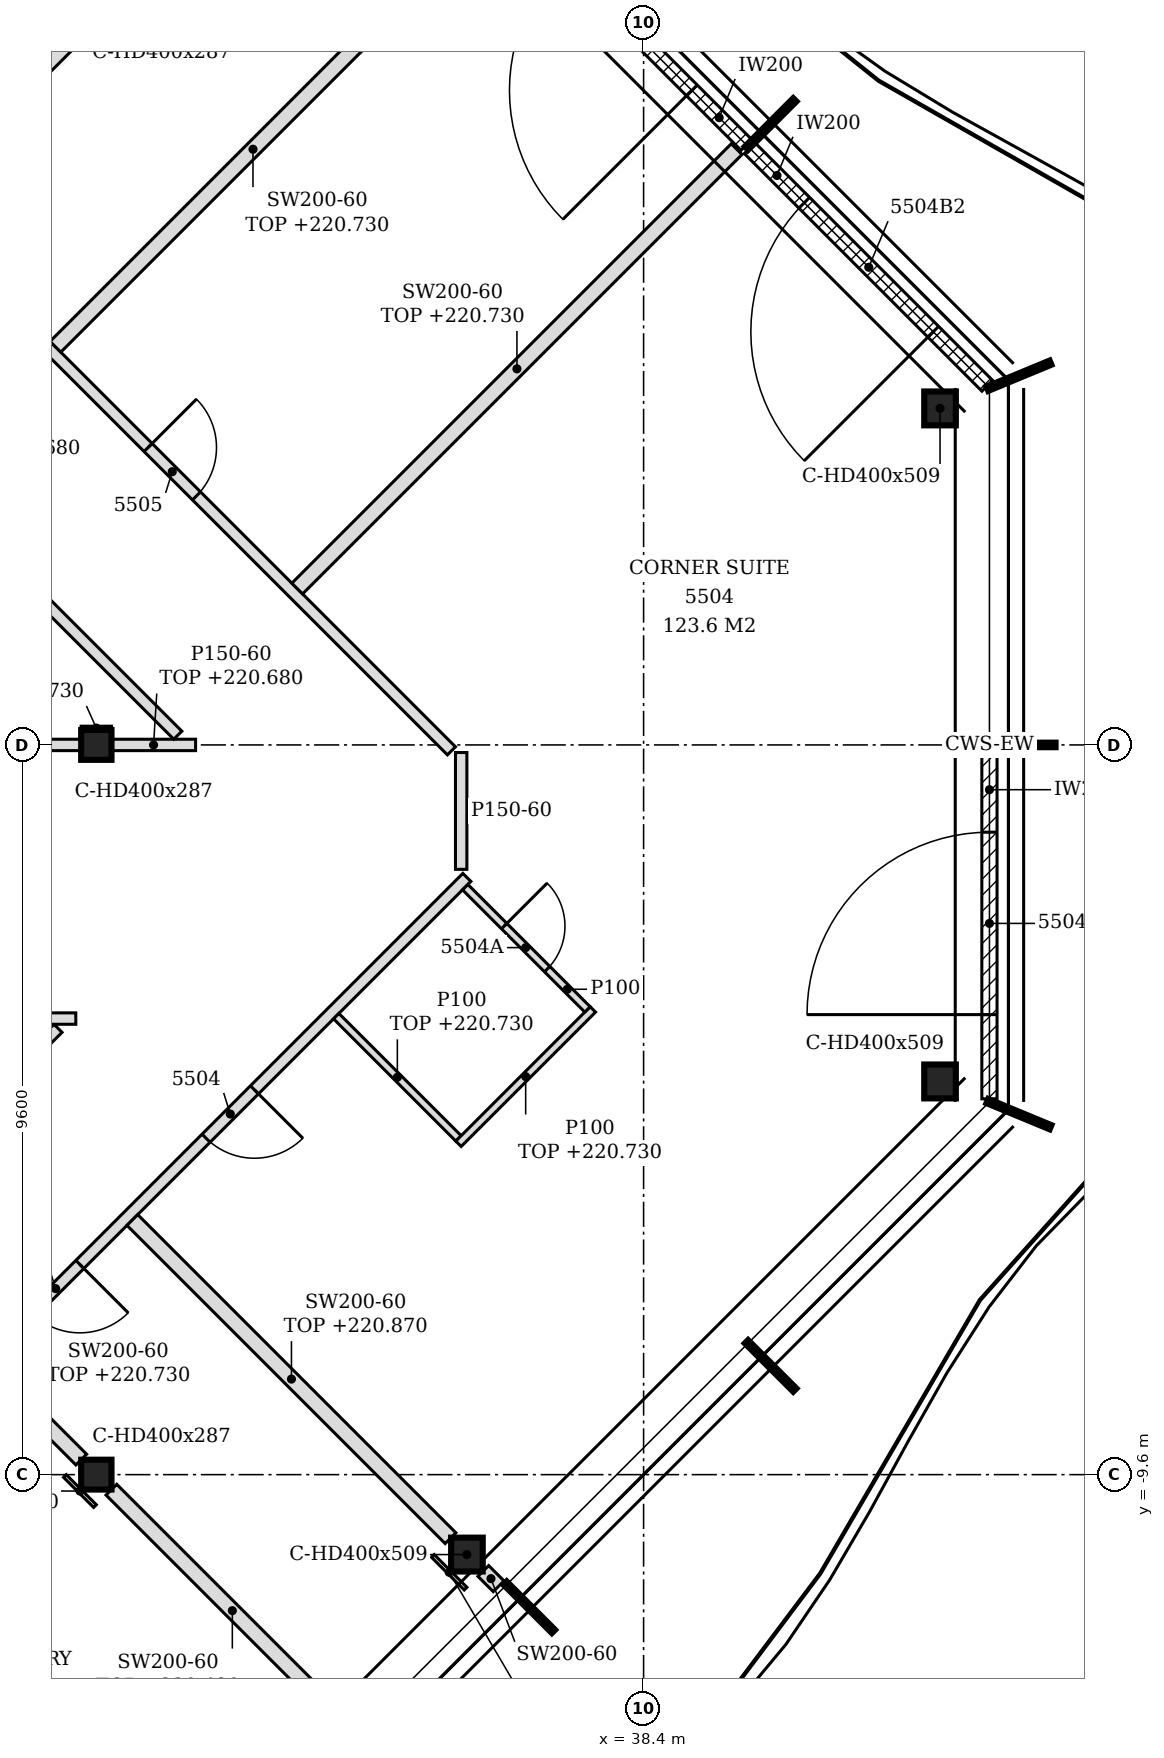
"""IFC4 building model, lengths in metres.
Left out: names, types, materials, properties, quantities, classifications, styles, units other than length and angle.
Written with IfcOpenShell. Run it as: python <this file> out.ifc"""

import sys

from ifc_helpers import new_model, si_unit, direction, frame, frame_2d, origin, origin_2d, place, context, subcontext, project, spatial, polyline, rectangle, i_section, outline, extrude, element, fill, save


model = new_model("IFC4")
c1 = context("Model", 3, precision=1e-05, world=origin(), true_north=direction((0.0, 1.0)))
c2 = subcontext(c1, "Body", "Model", "MODEL_VIEW")
j1 = project(units=[si_unit("LENGTHUNIT", "METRE"), si_unit("PLANEANGLEUNIT", "RADIAN")], contexts=[c1])
p1 = place(None, origin())
s1 = spatial("IfcSite", under=j1, at=p1, CompositionType="ELEMENT")
p2 = place(p1, origin())
s2 = spatial("IfcBuilding", under=s1, at=p2, CompositionType="ELEMENT")
p3 = place(p2, frame((0.0, 0.0, 217.8)))
s3 = spatial("IfcBuildingStorey", under=s2, at=p3, CompositionType="ELEMENT", Elevation=217.8)
for number, where, z_axis, x_axis in (
    (1, (36.076, -10.652, -0.15), (0.0, 0.0, 1.0), (1.0, 0.0, 0.0)),
    (2, (42.3, -4.427, -0.15), (0.0, 0.0, 1.0), (1.0, 0.0, 0.0)),
    (3, (42.3, 4.427, -0.15), (0.0, 0.0, 1.0), (1.0, 0.0, 0.0)),
):
    element("IfcColumn", number, at=place(p3, frame(where, z_axis=z_axis, x_axis=x_axis)), inside=s3, PredefinedType="COLUMN", context=c2, shape_type="SweptSolid", body=[
        extrude(i_section(OverallWidth=0.416, OverallDepth=0.446, WebThickness=0.039, FlangeThickness=0.063, FilletRadius=0.015, at=origin_2d()), origin(), (0.0, 0.0, 1.0), 3.6),
    ])
for number, where, z_axis, x_axis in (
    (4, (31.2, -9.6, -0.15), (0.0, 0.0, 1.0), (1.0, 0.0, 0.0)),
    (5, (31.2, 0.0, -0.15), (0.0, 0.0, 1.0), (1.0, 0.0, 0.0)),
):
    element("IfcColumn", number, at=place(p3, frame(where, z_axis=z_axis, x_axis=x_axis)), inside=s3, PredefinedType="COLUMN", context=c2, shape_type="SweptSolid", body=[
        extrude(i_section(OverallWidth=0.399, OverallDepth=0.393, WebThickness=0.023, FlangeThickness=0.037, FilletRadius=0.015, at=origin_2d()), origin(), (0.0, 0.0, 1.0), 3.6),
    ])
p4 = place(p3, frame((42.95, -4.656, 0.0), z_axis=(0.0, 0.0, 1.0), x_axis=(0.0, 1.0, 0.0)))
e6 = element("IfcWall", 6, at=p4, inside=s3, PredefinedType="NOTDEFINED", context=c2, shape_type="SweptSolid", body=[
    extrude(rectangle(XDim=4.626, YDim=0.2, at=frame_2d((2.313, 0.0))), origin(), (0.0, 0.0, 1.0), 3.45),
])
p5 = place(p4, frame((1.108, 0.0, 0.0)))
e7 = element("IfcOpeningElement", 7, at=p5, cuts=e6, PredefinedType="OPENING", context=c2, shape_type="SweptSolid", body=[
    extrude(rectangle(XDim=2.4, YDim=2.4, at=frame_2d((1.2, 1.2))), frame((0.0, 0.11, 0.0), z_axis=(0.0, -1.0, 0.0), x_axis=(1.0, 0.0, 0.0)), (0.0, 0.0, 1.0), 0.22),
])
p6 = place(p3, frame((42.922, 4.725, 0.0), z_axis=(0.0, 0.0, 1.0), x_axis=(-0.707079168996, 0.707134392299, 0.0)))
e8 = element("IfcWall", 8, at=p6, inside=s3, PredefinedType="NOTDEFINED", context=c2, shape_type="SweptSolid", body=[
    extrude(rectangle(XDim=4.421, YDim=0.2, at=frame_2d((2.21, 0.0))), origin(), (0.0, 0.0, 1.0), 3.45),
])
p7 = place(p6, frame((1.005, 0.0, 0.0)))
e9 = element("IfcOpeningElement", 9, at=p7, cuts=e8, PredefinedType="OPENING", context=c2, shape_type="SweptSolid", body=[
    extrude(rectangle(XDim=2.4, YDim=2.4, at=frame_2d((1.2, 1.2))), frame((0.0, 0.11, 0.0), z_axis=(0.0, -1.0, 0.0), x_axis=(1.0, 0.0, 0.0)), (0.0, 0.0, 1.0), 0.22),
])
p8 = place(p3, frame((39.753, 7.893, 0.0), z_axis=(0.0, 0.0, 1.0), x_axis=(-0.707106781187, 0.707106781187, 0.0)))
e10 = element("IfcWall", 10, at=p8, inside=s3, PredefinedType="NOTDEFINED", context=c2, shape_type="SweptSolid", body=[
    extrude(rectangle(XDim=4.431, YDim=0.2, at=frame_2d((2.215, 0.0))), origin(), (0.0, 0.0, 1.0), 3.45),
])
p9 = place(p8, frame((1.016, 0.0, 0.0)))
e11 = element("IfcOpeningElement", 11, at=p9, cuts=e10, PredefinedType="OPENING", context=c2, shape_type="SweptSolid", body=[
    extrude(rectangle(XDim=2.4, YDim=2.4, at=frame_2d((1.2, 1.2))), frame((0.0, 0.11, 0.0), z_axis=(0.0, -1.0, 0.0), x_axis=(1.0, 0.0, 0.0)), (0.0, 0.0, 1.0), 0.22),
])
p10 = place(p3, frame((21.146, -16.672, 0.0), z_axis=(0.0, 0.0, 1.0), x_axis=(0.707100999376, 0.70711256295, 0.0)))
e12 = element("IfcWall", 12, at=p10, inside=s3, PredefinedType="PARTITIONING", context=c2, shape_type="SweptSolid", body=[
    extrude(rectangle(XDim=21.113, YDim=0.15, at=frame_2d((10.556, 0.0))), origin(), (0.0, 0.0, 1.0), 2.88),
])
p11 = place(p10, frame((2.466, 0.0, 0.0)))
e13 = element("IfcOpeningElement", 13, at=p11, cuts=e12, PredefinedType="OPENING", context=c2, shape_type="SweptSolid", body=[
    extrude(rectangle(XDim=0.9, YDim=2.1, at=frame_2d((0.45, 1.05))), frame((0.0, 0.085, 0.0), z_axis=(0.0, -1.0, 0.0), x_axis=(1.0, 0.0, 0.0)), (0.0, 0.0, 1.0), 0.17),
])
p12 = place(p10, frame((8.611, 0.0, 0.0)))
e14 = element("IfcOpeningElement", 14, at=p12, cuts=e12, PredefinedType="OPENING", context=c2, shape_type="SweptSolid", body=[
    extrude(rectangle(XDim=0.9, YDim=2.1, at=frame_2d((0.45, 1.05))), frame((0.0, 0.085, 0.0), z_axis=(0.0, -1.0, 0.0), x_axis=(1.0, 0.0, 0.0)), (0.0, 0.0, 1.0), 0.17),
])
p13 = place(p10, frame((13.012, 0.0, 0.0)))
e15 = element("IfcOpeningElement", 15, at=p13, cuts=e12, PredefinedType="OPENING", context=c2, shape_type="SweptSolid", body=[
    extrude(rectangle(XDim=0.9, YDim=2.1, at=frame_2d((0.45, 1.05))), frame((0.0, 0.085, 0.0), z_axis=(0.0, -1.0, 0.0), x_axis=(1.0, 0.0, 0.0)), (0.0, 0.0, 1.0), 0.17),
])
p14 = place(p10, frame((16.261, 0.0, 0.0)))
e16 = element("IfcOpeningElement", 16, at=p14, cuts=e12, PredefinedType="OPENING", context=c2, shape_type="SweptSolid", body=[
    extrude(rectangle(XDim=0.9, YDim=2.1, at=frame_2d((0.45, 1.05))), frame((0.0, 0.085, 0.0), z_axis=(0.0, -1.0, 0.0), x_axis=(1.0, 0.0, 0.0)), (0.0, 0.0, 1.0), 0.17),
])
p15 = place(p3, frame((34.581, -12.981, 0.0), z_axis=(0.0, 0.0, 1.0), x_axis=(-0.707133900936, 0.707079660397, 0.0)))
e17 = element("IfcWall", 17, at=p15, inside=s3, PredefinedType="PARTITIONING", context=c2, shape_type="SweptSolid", body=[
    extrude(rectangle(XDim=4.501, YDim=0.2, at=frame_2d((2.25, 0.0))), origin(), (0.0, 0.0, 1.0), 2.63),
])
p16 = place(p3, frame((36.493, -11.069, 0.0), z_axis=(0.0, 0.0, 1.0), x_axis=(-0.707534423513, 0.706678880075, 0.0)))
e18 = element("IfcWall", 18, at=p16, inside=s3, PredefinedType="PARTITIONING", context=c2, shape_type="SweptSolid", body=[
    extrude(rectangle(XDim=0.285, YDim=0.2, at=frame_2d((0.143, 0.0))), origin(), (0.0, 0.0, 1.0), 3.45),
])
p17 = place(p3, frame((35.86, -10.436, 0.0), z_axis=(0.0, 0.0, 1.0), x_axis=(-0.707106781187, 0.707106781187, 0.0)))
e19 = element("IfcWall", 19, at=p17, inside=s3, PredefinedType="PARTITIONING", context=c2, shape_type="SweptSolid", body=[
    extrude(rectangle(XDim=5.92, YDim=0.2, at=frame_2d((2.96, 0.0))), origin(), (0.0, 0.0, 1.0), 3.07),
])
p18 = place(p3, frame((31.002, -9.402, 0.0), z_axis=(0.0, 0.0, 1.0), x_axis=(-0.707106781187, 0.707106781187, 0.0)))
e20 = element("IfcWall", 20, at=p18, inside=s3, PredefinedType="PARTITIONING", context=c2, shape_type="SweptSolid", body=[
    extrude(rectangle(XDim=1.754, YDim=0.2, at=frame_2d((0.877, 0.0))), origin(), (0.0, 0.0, 1.0), 2.93),
])
p19 = place(p3, frame((26.151, -8.272, 0.0), z_axis=(0.0, 0.0, 1.0), x_axis=(0.707163762272, 0.707049795509, 0.0)))
e21 = element("IfcWall", 21, at=p19, inside=s3, PredefinedType="PARTITIONING", context=c2, shape_type="SweptSolid", body=[
    extrude(rectangle(XDim=6.427, YDim=0.15, at=frame_2d((3.213, 0.0))), origin(), (0.0, 0.0, 1.0), 2.88),
])
p20 = place(p3, frame((35.965, -5.177, 0.0), z_axis=(0.0, 0.0, 1.0), x_axis=(-0.707160441348, 0.707053116953, 0.0)))
e22 = element("IfcWall", 22, at=p20, inside=s3, PredefinedType="PARTITIONING", context=c2, shape_type="SweptSolid", body=[
    extrude(rectangle(XDim=2.275, YDim=0.1, at=frame_2d((1.137, 0.0))), origin(), (0.0, 0.0, 1.0), 2.93),
])
p21 = place(p3, frame((35.965, -5.247, 0.0), z_axis=(0.0, 0.0, 1.0), x_axis=(0.707155609469, 0.707057949532, 0.0)))
e23 = element("IfcWall", 23, at=p21, inside=s3, PredefinedType="PARTITIONING", context=c2, shape_type="SweptSolid", body=[
    extrude(rectangle(XDim=2.5, YDim=0.1, at=frame_2d((1.25, 0.0))), origin(), (0.0, 0.0, 1.0), 2.93),
])
p22 = place(p3, frame((19.125, -3.6, 0.0), z_axis=(0.0, 0.0, 1.0), x_axis=(1.0, 0.0, 0.0)))
e24 = element("IfcWall", 24, at=p22, inside=s3, PredefinedType="PARTITIONING", context=c2, shape_type="SweptSolid", body=[
    extrude(outline(polyline([(0.0, 0.0), (11.805, 0.0), (11.805, 3.45), (0.225, 3.45), (0.223, 2.83), (0.0, 2.83), (0.0, 0.0)])), frame((0.0, 0.075, 0.0), z_axis=(0.0, -1.0, 0.0), x_axis=(1.0, 0.0, 0.0)), (0.0, 0.0, 1.0), 0.15),
])
p23 = place(p22, frame((5.437, 0.0, 0.0)))
e25 = element("IfcOpeningElement", 25, at=p23, cuts=e24, PredefinedType="OPENING", context=c2, shape_type="SweptSolid", body=[
    extrude(rectangle(XDim=0.9, YDim=2.1, at=frame_2d((0.45, 1.05))), frame((0.0, 0.085, 0.0), z_axis=(0.0, -1.0, 0.0), x_axis=(1.0, 0.0, 0.0)), (0.0, 0.0, 1.0), 0.17),
])
p24 = place(p3, frame((37.662, -3.479, 0.0), z_axis=(0.0, 0.0, 1.0), x_axis=(-0.707160441348, 0.707053116953, 0.0)))
e26 = element("IfcWall", 26, at=p24, inside=s3, PredefinedType="PARTITIONING", context=c2, shape_type="SweptSolid", body=[
    extrude(rectangle(XDim=2.275, YDim=0.1, at=frame_2d((1.137, 0.0))), origin(), (0.0, 0.0, 1.0), 3.45),
])
p25 = place(p24, frame((0.75, 0.0, 0.0)))
e27 = element("IfcOpeningElement", 27, at=p25, cuts=e26, PredefinedType="OPENING", context=c2, shape_type="SweptSolid", body=[
    extrude(rectangle(XDim=0.8, YDim=2.1, at=frame_2d((0.4, 1.05))), frame((0.0, 0.06, 0.0), z_axis=(0.0, -1.0, 0.0), x_axis=(1.0, 0.0, 0.0)), (0.0, 0.0, 1.0), 0.12),
])
p26 = place(p3, frame((36.0, -1.637, 0.0), z_axis=(0.0, 0.0, 1.0), x_axis=(0.0, 1.0, 0.0)))
e28 = element("IfcWall", 28, at=p26, inside=s3, PredefinedType="PARTITIONING", context=c2, shape_type="SweptSolid", body=[
    extrude(outline(polyline([(0.0, 0.0), (1.537, 0.0), (1.537, 2.88), (1.532, 2.88), (1.53, 3.45), (0.0, 3.45), (0.0, 0.0)])), frame((0.0, 0.075, 0.0), z_axis=(0.0, -1.0, 0.0), x_axis=(1.0, 0.0, 0.0)), (0.0, 0.0, 1.0), 0.15),
])
p27 = place(p3, frame((35.872, -0.078, 0.0), z_axis=(0.0, 0.0, 1.0), x_axis=(-0.707113345155, 0.707100217157, 0.0)))
e29 = element("IfcWall", 29, at=p27, inside=s3, PredefinedType="PARTITIONING", context=c2, shape_type="SweptSolid", body=[
    extrude(rectangle(XDim=18.597, YDim=0.15, at=frame_2d((9.298, 0.0))), origin(), (0.0, 0.0, 1.0), 2.88),
])
p28 = place(p27, frame((4.744, 0.0, 0.0)))
e30 = element("IfcOpeningElement", 30, at=p28, cuts=e29, PredefinedType="OPENING", context=c2, shape_type="SweptSolid", body=[
    extrude(rectangle(XDim=0.9, YDim=2.1, at=frame_2d((0.45, 1.05))), frame((0.0, 0.085, 0.0), z_axis=(0.0, -1.0, 0.0), x_axis=(1.0, 0.0, 0.0)), (0.0, 0.0, 1.0), 0.17),
])
p29 = place(p27, frame((8.345, 0.0, 0.0)))
e31 = element("IfcOpeningElement", 31, at=p29, cuts=e29, PredefinedType="OPENING", context=c2, shape_type="SweptSolid", body=[
    extrude(rectangle(XDim=0.9, YDim=2.1, at=frame_2d((0.45, 1.05))), frame((0.0, 0.085, 0.0), z_axis=(0.0, -1.0, 0.0), x_axis=(1.0, 0.0, 0.0)), (0.0, 0.0, 1.0), 0.17),
])
p30 = place(p27, frame((12.746, 0.0, 0.0)))
e32 = element("IfcOpeningElement", 32, at=p30, cuts=e29, PredefinedType="OPENING", context=c2, shape_type="SweptSolid", body=[
    extrude(rectangle(XDim=0.9, YDim=2.1, at=frame_2d((0.45, 1.05))), frame((0.0, 0.085, 0.0), z_axis=(0.0, -1.0, 0.0), x_axis=(1.0, 0.0, 0.0)), (0.0, 0.0, 1.0), 0.17),
])
p31 = place(p3, frame((19.125, 0.0, 0.0), z_axis=(0.0, 0.0, 1.0), x_axis=(1.0, 0.0, 0.0)))
e33 = element("IfcWall", 33, at=p31, inside=s3, PredefinedType="PARTITIONING", context=c2, shape_type="SweptSolid", body=[
    extrude(outline(polyline([(0.0, 0.0), (11.875, 0.0), (11.875, 2.88), (0.225, 2.88), (0.223, 2.83), (0.0, 2.83), (0.0, 0.0)])), frame((0.0, 0.075, 0.0), z_axis=(0.0, -1.0, 0.0), x_axis=(1.0, 0.0, 0.0)), (0.0, 0.0, 1.0), 0.15),
])
p32 = place(p3, frame((31.399, 0.0, 0.0), z_axis=(0.0, 0.0, 1.0), x_axis=(1.0, 0.0, 0.0)))
e34 = element("IfcWall", 34, at=p32, inside=s3, PredefinedType="PARTITIONING", context=c2, shape_type="SweptSolid", body=[
    extrude(rectangle(XDim=1.107, YDim=0.15, at=frame_2d((0.553, 0.0))), origin(), (0.0, 0.0, 1.0), 2.88),
])
p33 = place(p3, frame((32.272, 0.128, 0.0), z_axis=(0.0, 0.0, 1.0), x_axis=(-0.707106781187, 0.707106781187, 0.0)))
e35 = element("IfcWall", 35, at=p33, inside=s3, PredefinedType="PARTITIONING", context=c2, shape_type="SweptSolid", body=[
    extrude(rectangle(XDim=18.207, YDim=0.15, at=frame_2d((9.103, 0.0))), origin(), (0.0, 0.0, 1.0), 2.88),
])
p34 = place(p33, frame((8.703, 0.0, 0.0)))
e36 = element("IfcOpeningElement", 36, at=p34, cuts=e35, PredefinedType="OPENING", context=c2, shape_type="SweptSolid", body=[
    extrude(rectangle(XDim=0.9, YDim=2.1, at=frame_2d((0.45, 1.05))), frame((0.0, 0.085, 0.0), z_axis=(0.0, -1.0, 0.0), x_axis=(1.0, 0.0, 0.0)), (0.0, 0.0, 1.0), 0.17),
])
p35 = place(p3, frame((33.843, 2.057, 0.0), z_axis=(0.0, 0.0, 1.0), x_axis=(0.70709185088, 0.707121711178, 0.0)))
e37 = element("IfcWall", 37, at=p35, inside=s3, PredefinedType="PARTITIONING", context=c2, shape_type="SweptSolid", body=[
    extrude(rectangle(XDim=8.176, YDim=0.2, at=frame_2d((4.088, 0.0))), origin(), (0.0, 0.0, 1.0), 2.93),
])
p36 = place(p3, frame((30.662, 5.238, 0.0), z_axis=(0.0, 0.0, 1.0), x_axis=(0.707106781187, 0.707106781187, 0.0)))
e38 = element("IfcWall", 38, at=p36, inside=s3, PredefinedType="PARTITIONING", context=c2, shape_type="SweptSolid", body=[
    extrude(rectangle(XDim=7.351, YDim=0.2, at=frame_2d((3.676, 0.0))), origin(), (0.0, 0.0, 1.0), 2.93),
])
p37 = place(p3, frame((28.75, 7.15, 0.0), z_axis=(0.0, 0.0, 1.0), x_axis=(0.7070684525, 0.707145107796, 0.0)))
e39 = element("IfcWall", 39, at=p37, inside=s3, PredefinedType="PARTITIONING", context=c2, shape_type="SweptSolid", body=[
    extrude(rectangle(XDim=3.185, YDim=0.2, at=frame_2d((1.592, 0.0))), origin(), (0.0, 0.0, 1.0), 2.93),
])
p38 = place(p3, frame((31.182, -10.014, 0.0), z_axis=(0.0, 0.0, 1.0), x_axis=(-0.707106781187, 0.707106781187, 0.0)))
e40 = element("IfcWall", 40, at=p38, inside=s3, PredefinedType="PARTITIONING", context=c2, shape_type="SweptSolid", body=[
    extrude(rectangle(XDim=0.56, YDim=0.05, at=frame_2d((0.28, 0.0))), origin(), (0.0, 0.0, 1.0), 2.88),
])
p39 = place(p3, frame((36.058, -11.1, 0.0), z_axis=(0.0, 0.0, 1.0), x_axis=(-0.707307009627, 0.706906496032, 0.0)))
e41 = element("IfcWall", 41, at=p39, inside=s3, PredefinedType="PARTITIONING", context=c2, shape_type="SweptSolid", body=[
    extrude(rectangle(XDim=0.61, YDim=0.05, at=frame_2d((0.305, 0.0))), origin(), (0.0, 0.0, 1.0), 2.63),
])
p40 = place(p3, frame((31.0, 0.221, 0.0), z_axis=(0.0, 0.0, 1.0), x_axis=(1.0, 0.0, 0.0)))
e42 = element("IfcWall", 42, at=p40, inside=s3, PredefinedType="PARTITIONING", context=c2, shape_type="SweptSolid", body=[
    extrude(rectangle(XDim=0.399, YDim=0.05, at=frame_2d((0.199, 0.0))), origin(), (0.0, 0.0, 1.0), 2.93),
])
p41 = place(p5, origin())
e43 = element("IfcDoor", 43, at=p41, inside=s3, OperationType="SINGLE_SWING_LEFT", PredefinedType="DOOR", context=c2, shape_type="SweptSolid", body=[
    extrude(rectangle(XDim=2.4, YDim=2.4, at=frame_2d((1.2, 1.2))), frame((0.0, 0.025, 0.0), z_axis=(0.0, -1.0, 0.0), x_axis=(1.0, 0.0, 0.0)), (0.0, 0.0, 1.0), 0.05),
])
fill(e7, e43)
p42 = place(p7, origin())
e44 = element("IfcDoor", 44, at=p42, inside=s3, OperationType="SINGLE_SWING_LEFT", PredefinedType="DOOR", context=c2, shape_type="SweptSolid", body=[
    extrude(rectangle(XDim=2.4, YDim=2.4, at=frame_2d((1.2, 1.2))), frame((0.0, 0.025, 0.0), z_axis=(0.0, -1.0, 0.0), x_axis=(1.0, 0.0, 0.0)), (0.0, 0.0, 1.0), 0.05),
])
fill(e9, e44)
p43 = place(p9, origin())
e45 = element("IfcDoor", 45, at=p43, inside=s3, OperationType="SINGLE_SWING_LEFT", PredefinedType="DOOR", context=c2, shape_type="SweptSolid", body=[
    extrude(rectangle(XDim=2.4, YDim=2.4, at=frame_2d((1.2, 1.2))), frame((0.0, 0.025, 0.0), z_axis=(0.0, -1.0, 0.0), x_axis=(1.0, 0.0, 0.0)), (0.0, 0.0, 1.0), 0.05),
])
fill(e11, e45)
p44 = place(p13, frame((0.9, 0.0, 0.0), z_axis=(0.0, 0.0, 1.0), x_axis=(-1.0, 0.0, 0.0)))
e46 = element("IfcDoor", 46, at=p44, inside=s3, OperationType="SINGLE_SWING_LEFT", PredefinedType="DOOR", context=c2, shape_type="SweptSolid", body=[
    extrude(rectangle(XDim=0.9, YDim=2.1, at=frame_2d((0.45, 1.05))), frame((0.0, 0.025, 0.0), z_axis=(0.0, -1.0, 0.0), x_axis=(1.0, 0.0, 0.0)), (0.0, 0.0, 1.0), 0.05),
])
fill(e15, e46)
p45 = place(p14, frame((0.9, 0.0, 0.0), z_axis=(0.0, 0.0, 1.0), x_axis=(-1.0, 0.0, 0.0)))
e47 = element("IfcDoor", 47, at=p45, inside=s3, OperationType="SINGLE_SWING_LEFT", PredefinedType="DOOR", context=c2, shape_type="SweptSolid", body=[
    extrude(rectangle(XDim=0.9, YDim=2.1, at=frame_2d((0.45, 1.05))), frame((0.0, 0.025, 0.0), z_axis=(0.0, -1.0, 0.0), x_axis=(1.0, 0.0, 0.0)), (0.0, 0.0, 1.0), 0.05),
])
fill(e16, e47)
p46 = place(p25, frame((0.8, 0.0, 0.0), z_axis=(0.0, 0.0, 1.0), x_axis=(-1.0, 0.0, 0.0)))
e48 = element("IfcDoor", 48, at=p46, inside=s3, OperationType="SINGLE_SWING_LEFT", PredefinedType="DOOR", context=c2, shape_type="SweptSolid", body=[
    extrude(rectangle(XDim=0.8, YDim=2.1, at=frame_2d((0.4, 1.05))), frame((0.0, 0.025, 0.0), z_axis=(0.0, -1.0, 0.0), x_axis=(1.0, 0.0, 0.0)), (0.0, 0.0, 1.0), 0.05),
])
fill(e27, e48)
p47 = place(p28, frame((0.9, 0.0, 0.0), z_axis=(0.0, 0.0, 1.0), x_axis=(-1.0, 0.0, 0.0)))
e49 = element("IfcDoor", 49, at=p47, inside=s3, OperationType="SINGLE_SWING_LEFT", PredefinedType="DOOR", context=c2, shape_type="SweptSolid", body=[
    extrude(rectangle(XDim=0.9, YDim=2.1, at=frame_2d((0.45, 1.05))), frame((0.0, 0.025, 0.0), z_axis=(0.0, -1.0, 0.0), x_axis=(1.0, 0.0, 0.0)), (0.0, 0.0, 1.0), 0.05),
])
fill(e30, e49)
save(model, sys.argv[1])
